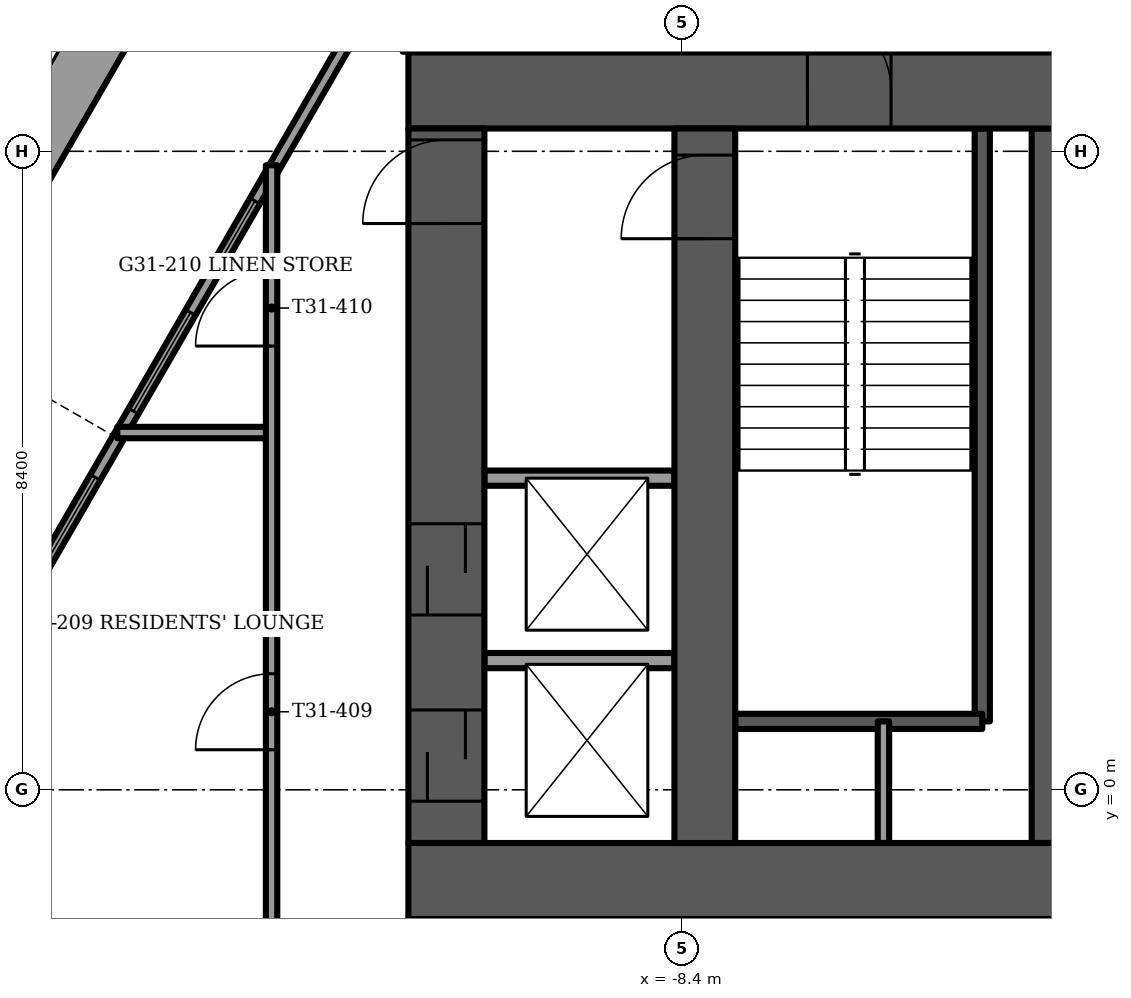
"""IFC4 building model, lengths in metres.
Left out: names, types, materials, properties, quantities, classifications, styles, units other than length and angle.
Written with IfcOpenShell. Run it as: python <this file> out.ifc"""

import sys

from ifc_helpers import new_model, si_unit, direction, frame, frame_2d, origin, place, context, subcontext, project, spatial, rectangle, extrude, element, fill, save


model = new_model("IFC4")
c1 = context("Model", 3, precision=1e-05, world=origin(), true_north=direction((0.0, 1.0)))
c2 = subcontext(c1, "Body", "Model", "MODEL_VIEW")
j1 = project(units=[si_unit("LENGTHUNIT", "METRE"), si_unit("PLANEANGLEUNIT", "RADIAN")], contexts=[c1])
p1 = place(None, origin())
s1 = spatial("IfcSite", under=j1, at=p1, CompositionType="ELEMENT")
p2 = place(p1, origin())
s2 = spatial("IfcBuilding", under=s1, at=p2, CompositionType="ELEMENT")
p3 = place(p2, frame((0.0, 0.0, 127.25)))
s3 = spatial("IfcBuildingStorey", under=s2, at=p3, CompositionType="ELEMENT", Elevation=127.25)
p4 = place(p3, frame((-12.0, -1.2, -0.3), z_axis=(0.0, 0.0, 1.0), x_axis=(1.0, 0.0, 0.0)))
e1 = element("IfcWall", 1, at=p4, inside=s3, PredefinedType="SHEAR", context=c2, shape_type="SweptSolid", body=[
    extrude(rectangle(XDim=24.0, YDim=1.0, at=frame_2d((12.0, 0.0))), origin(), (0.0, 0.0, 1.0), 3.75),
])
p5 = place(p4, frame((11.2, 0.0, 0.0)))
e2 = element("IfcOpeningElement", 2, at=p5, cuts=e1, PredefinedType="OPENING", context=c2, shape_type="SweptSolid", body=[
    extrude(rectangle(XDim=1.6, YDim=2.1, at=frame_2d((0.8, 1.05))), frame((0.0, 0.5, 0.0), z_axis=(0.0, -1.0, 0.0), x_axis=(1.0, 0.0, 0.0)), (0.0, 0.0, 1.0), 1.0),
])
p6 = place(p3, frame((-12.0, 9.2, -0.3), z_axis=(0.0, 0.0, 1.0), x_axis=(1.0, 0.0, 0.0)))
e3 = element("IfcWall", 3, at=p6, inside=s3, PredefinedType="SHEAR", context=c2, shape_type="SweptSolid", body=[
    extrude(rectangle(XDim=24.0, YDim=1.0, at=frame_2d((12.0, 0.0))), origin(), (0.0, 0.0, 1.0), 3.75),
])
p7 = place(p6, frame((11.2, 0.0, 0.0)))
e4 = element("IfcOpeningElement", 4, at=p7, cuts=e3, PredefinedType="OPENING", context=c2, shape_type="SweptSolid", body=[
    extrude(rectangle(XDim=1.6, YDim=2.1, at=frame_2d((0.8, 1.05))), frame((0.0, 0.5, 0.0), z_axis=(0.0, -1.0, 0.0), x_axis=(1.0, 0.0, 0.0)), (0.0, 0.0, 1.0), 1.0),
])
p8 = place(p6, frame((5.25, 0.0, 0.0)))
e5 = element("IfcOpeningElement", 5, at=p8, cuts=e3, PredefinedType="OPENING", context=c2, shape_type="SweptSolid", body=[
    extrude(rectangle(XDim=1.1, YDim=2.1, at=frame_2d((0.55, 1.05))), frame((0.0, 0.5, 0.0), z_axis=(0.0, -1.0, 0.0), x_axis=(1.0, 0.0, 0.0)), (0.0, 0.0, 1.0), 1.0),
])
p9 = place(p6, frame((17.65, 0.0, 0.0)))
e6 = element("IfcOpeningElement", 6, at=p9, cuts=e3, PredefinedType="OPENING", context=c2, shape_type="SweptSolid", body=[
    extrude(rectangle(XDim=1.1, YDim=2.1, at=frame_2d((0.55, 1.05))), frame((0.0, 0.5, 0.0), z_axis=(0.0, -1.0, 0.0), x_axis=(1.0, 0.0, 0.0)), (0.0, 0.0, 1.0), 1.0),
])
p10 = place(p3, frame((-8.1, -0.7, -0.3), z_axis=(0.0, 0.0, 1.0), x_axis=(0.0, 1.0, 0.0)))
e7 = element("IfcWall", 7, at=p10, inside=s3, PredefinedType="SHEAR", context=c2, shape_type="SweptSolid", body=[
    extrude(rectangle(XDim=9.4, YDim=0.8, at=frame_2d((4.7, 0.0))), origin(), (0.0, 0.0, 1.0), 3.75),
])
p11 = place(p10, frame((7.95, 0.0, 0.0)))
e8 = element("IfcOpeningElement", 8, at=p11, cuts=e7, PredefinedType="OPENING", context=c2, shape_type="SweptSolid", body=[
    extrude(rectangle(XDim=1.1, YDim=2.1, at=frame_2d((0.55, 1.05))), frame((0.0, 0.4, 0.0), z_axis=(0.0, -1.0, 0.0), x_axis=(1.0, 0.0, 0.0)), (0.0, 0.0, 1.0), 0.8),
])
p12 = place(p3, frame((-3.6, -0.7, -0.3), z_axis=(0.0, 0.0, 1.0), x_axis=(0.0, 1.0, 0.0)))
e9 = element("IfcWall", 9, at=p12, inside=s3, PredefinedType="SHEAR", context=c2, shape_type="SweptSolid", body=[
    extrude(rectangle(XDim=9.4, YDim=0.4, at=frame_2d((4.7, 0.0))), origin(), (0.0, 0.0, 1.0), 3.75),
])
p13 = place(p3, frame((-11.5, -0.7, -0.3), z_axis=(0.0, 0.0, 1.0), x_axis=(0.0, 1.0, 0.0)))
e10 = element("IfcWall", 10, at=p13, inside=s3, PredefinedType="SHEAR", context=c2, shape_type="SweptSolid", body=[
    extrude(rectangle(XDim=9.4, YDim=1.0, at=frame_2d((4.7, 0.0))), origin(), (0.0, 0.0, 1.0), 3.75),
])
p14 = place(p13, frame((8.15, 0.0, 0.0)))
e11 = element("IfcOpeningElement", 11, at=p14, cuts=e10, PredefinedType="OPENING", context=c2, shape_type="SweptSolid", body=[
    extrude(rectangle(XDim=1.1, YDim=2.1, at=frame_2d((0.55, 1.05))), frame((0.0, 0.5, 0.0), z_axis=(0.0, -1.0, 0.0), x_axis=(1.0, 0.0, 0.0)), (0.0, 0.0, 1.0), 1.0),
])
p15 = place(p13, frame((0.55, 0.0, 0.0)))
e12 = element("IfcOpeningElement", 12, at=p15, cuts=e10, PredefinedType="OPENING", context=c2, shape_type="SweptSolid", body=[
    extrude(rectangle(XDim=1.2, YDim=2.1, at=frame_2d((0.6, 1.05))), frame((0.0, 0.5, 0.0), z_axis=(0.0, -1.0, 0.0), x_axis=(1.0, 0.0, 0.0)), (0.0, 0.0, 1.0), 1.0),
])
p16 = place(p13, frame((3.0, 0.0, 0.0)))
e13 = element("IfcOpeningElement", 13, at=p16, cuts=e10, PredefinedType="OPENING", context=c2, shape_type="SweptSolid", body=[
    extrude(rectangle(XDim=1.2, YDim=2.1, at=frame_2d((0.6, 1.05))), frame((0.0, 0.5, 0.0), z_axis=(0.0, -1.0, 0.0), x_axis=(1.0, 0.0, 0.0)), (0.0, 0.0, 1.0), 1.0),
])
p17 = place(p3, frame((-14.733, 12.359, 0.0), z_axis=(0.0, 0.0, 1.0), x_axis=(-0.499999023957, -0.866025967302, 0.0)))
e14 = element("IfcWall", 14, at=p17, inside=s3, PredefinedType="PARAPET", context=c2, shape_type="SweptSolid", body=[
    extrude(rectangle(XDim=6.673, YDim=0.9, at=frame_2d((3.337, 0.0))), origin(), (0.0, 0.0, 1.0), 1.1),
])
p18 = place(p3, frame((-7.642, 18.792, 0.0), z_axis=(0.0, 0.0, 1.0), x_axis=(-0.500001219746, -0.866024699562, 0.0)))
e15 = element("IfcWall", 15, at=p18, inside=s3, PredefinedType="SOLIDWALL", context=c2, shape_type="SweptSolid", body=[
    extrude(rectangle(XDim=22.137, YDim=0.15, at=frame_2d((11.068, 0.0))), origin(), (0.0, 0.0, 1.0), 3.45),
])
p19 = place(p18, frame((4.354, 0.0, 0.15)))
e16 = element("IfcOpeningElement", 16, at=p19, cuts=e15, PredefinedType="OPENING", context=c2, shape_type="SweptSolid", body=[
    extrude(rectangle(XDim=0.9, YDim=2.85, at=frame_2d((0.45, 1.425))), frame((0.0, 0.075, 0.0), z_axis=(0.0, -1.0, 0.0), x_axis=(1.0, 0.0, 0.0)), (0.0, 0.0, 1.0), 0.15),
])
p20 = place(p18, frame((6.454, 0.0, 0.15)))
e17 = element("IfcOpeningElement", 17, at=p20, cuts=e15, PredefinedType="OPENING", context=c2, shape_type="SweptSolid", body=[
    extrude(rectangle(XDim=1.5, YDim=2.85, at=frame_2d((0.75, 1.425))), frame((0.0, 0.075, 0.0), z_axis=(0.0, -1.0, 0.0), x_axis=(1.0, 0.0, 0.0)), (0.0, 0.0, 1.0), 0.15),
])
p21 = place(p18, frame((8.554, 0.0, 0.15)))
e18 = element("IfcOpeningElement", 18, at=p21, cuts=e15, PredefinedType="OPENING", context=c2, shape_type="SweptSolid", body=[
    extrude(rectangle(XDim=0.9, YDim=2.85, at=frame_2d((0.45, 1.425))), frame((0.0, 0.075, 0.0), z_axis=(0.0, -1.0, 0.0), x_axis=(1.0, 0.0, 0.0)), (0.0, 0.0, 1.0), 0.15),
])
p22 = place(p18, frame((12.754, 0.0, 0.15)))
e19 = element("IfcOpeningElement", 19, at=p22, cuts=e15, PredefinedType="OPENING", context=c2, shape_type="SweptSolid", body=[
    extrude(rectangle(XDim=0.9, YDim=2.85, at=frame_2d((0.45, 1.425))), frame((0.0, 0.075, 0.0), z_axis=(0.0, -1.0, 0.0), x_axis=(1.0, 0.0, 0.0)), (0.0, 0.0, 1.0), 0.15),
])
p23 = place(p18, frame((14.449, 0.0, 0.15)))
e20 = element("IfcOpeningElement", 20, at=p23, cuts=e15, PredefinedType="OPENING", context=c2, shape_type="SweptSolid", body=[
    extrude(rectangle(XDim=1.5, YDim=2.85, at=frame_2d((0.75, 1.425))), frame((0.0, 0.075, 0.0), z_axis=(0.0, -1.0, 0.0), x_axis=(1.0, 0.0, 0.0)), (0.0, 0.0, 1.0), 0.15),
])
p24 = place(p18, frame((16.954, 0.0, 0.15)))
e21 = element("IfcOpeningElement", 21, at=p24, cuts=e15, PredefinedType="OPENING", context=c2, shape_type="SweptSolid", body=[
    extrude(rectangle(XDim=1.7, YDim=2.85, at=frame_2d((0.85, 1.425))), frame((0.0, 0.075, 0.0), z_axis=(0.0, -1.0, 0.0), x_axis=(1.0, 0.0, 0.0)), (0.0, 0.0, 1.0), 0.15),
])
p25 = place(p18, frame((19.054, 0.0, 0.0)))
e22 = element("IfcOpeningElement", 22, at=p25, cuts=e15, PredefinedType="OPENING", context=c2, shape_type="SweptSolid", body=[
    extrude(rectangle(XDim=1.5, YDim=2.4, at=frame_2d((0.75, 1.2))), frame((0.0, 0.075, 0.0), z_axis=(0.0, -1.0, 0.0), x_axis=(1.0, 0.0, 0.0)), (0.0, 0.0, 1.0), 0.15),
])
p26 = place(p18, frame((1.021, 0.0, 0.15)))
e23 = element("IfcOpeningElement", 23, at=p26, cuts=e15, PredefinedType="OPENING", context=c2, shape_type="SweptSolid", body=[
    extrude(rectangle(XDim=1.7, YDim=2.73, at=frame_2d((0.85, 1.365))), frame((0.0, 0.075, 0.0), z_axis=(0.0, -1.0, 0.0), x_axis=(1.0, 0.0, 0.0)), (0.0, 0.0, 1.0), 0.15),
])
p27 = place(p3, frame((-18.71, -1.444, 0.0), z_axis=(0.0, 0.0, 1.0), x_axis=(0.500010582961, -0.866019293623, 0.0)))
e24 = element("IfcWall", 24, at=p27, inside=s3, PredefinedType="SOLIDWALL", context=c2, shape_type="SweptSolid", body=[
    extrude(rectangle(XDim=16.21, YDim=0.15, at=frame_2d((8.105, 0.0))), origin(), (0.0, 0.0, 1.0), 3.45),
])
p28 = place(p27, frame((2.93, 0.0, 0.15)))
e25 = element("IfcOpeningElement", 25, at=p28, cuts=e24, PredefinedType="OPENING", context=c2, shape_type="SweptSolid", body=[
    extrude(rectangle(XDim=0.9, YDim=2.85, at=frame_2d((0.45, 1.425))), frame((0.0, 0.075, 0.0), z_axis=(0.0, -1.0, 0.0), x_axis=(1.0, 0.0, 0.0)), (0.0, 0.0, 1.0), 0.15),
])
p29 = place(p27, frame((4.205, 0.0, 0.0)))
e26 = element("IfcOpeningElement", 26, at=p29, cuts=e24, PredefinedType="OPENING", context=c2, shape_type="SweptSolid", body=[
    extrude(rectangle(XDim=1.5, YDim=2.4, at=frame_2d((0.75, 1.2))), frame((0.0, 0.075, 0.0), z_axis=(0.0, -1.0, 0.0), x_axis=(1.0, 0.0, 0.0)), (0.0, 0.0, 1.0), 0.15),
])
p30 = place(p27, frame((6.305, 0.0, 0.15)))
e27 = element("IfcOpeningElement", 27, at=p30, cuts=e24, PredefinedType="OPENING", context=c2, shape_type="SweptSolid", body=[
    extrude(rectangle(XDim=1.7, YDim=2.85, at=frame_2d((0.85, 1.425))), frame((0.0, 0.075, 0.0), z_axis=(0.0, -1.0, 0.0), x_axis=(1.0, 0.0, 0.0)), (0.0, 0.0, 1.0), 0.15),
])
p31 = place(p27, frame((8.405, 0.0, 0.0)))
e28 = element("IfcOpeningElement", 28, at=p31, cuts=e24, PredefinedType="OPENING", context=c2, shape_type="SweptSolid", body=[
    extrude(rectangle(XDim=1.5, YDim=2.4, at=frame_2d((0.75, 1.2))), frame((0.0, 0.075, 0.0), z_axis=(0.0, -1.0, 0.0), x_axis=(1.0, 0.0, 0.0)), (0.0, 0.0, 1.0), 0.15),
])
p32 = place(p27, frame((10.505, 0.0, 0.15)))
e29 = element("IfcOpeningElement", 29, at=p32, cuts=e24, PredefinedType="OPENING", context=c2, shape_type="SweptSolid", body=[
    extrude(rectangle(XDim=1.7, YDim=2.85, at=frame_2d((0.85, 1.425))), frame((0.0, 0.075, 0.0), z_axis=(0.0, -1.0, 0.0), x_axis=(1.0, 0.0, 0.0)), (0.0, 0.0, 1.0), 0.15),
])
p33 = place(p27, frame((12.605, 0.0, 0.0)))
e30 = element("IfcOpeningElement", 30, at=p33, cuts=e24, PredefinedType="OPENING", context=c2, shape_type="SweptSolid", body=[
    extrude(rectangle(XDim=1.5, YDim=2.4, at=frame_2d((0.75, 1.2))), frame((0.0, 0.075, 0.0), z_axis=(0.0, -1.0, 0.0), x_axis=(1.0, 0.0, 0.0)), (0.0, 0.0, 1.0), 0.15),
])
p34 = place(p27, frame((0.402, 0.0, 0.15)))
e31 = element("IfcOpeningElement", 31, at=p34, cuts=e24, PredefinedType="OPENING", context=c2, shape_type="SweptSolid", body=[
    extrude(rectangle(XDim=0.9, YDim=2.73, at=frame_2d((0.45, 1.365))), frame((0.0, 0.075, 0.0), z_axis=(0.0, -1.0, 0.0), x_axis=(1.0, 0.0, 0.0)), (0.0, 0.0, 1.0), 0.15),
])
p35 = place(p27, frame((14.907, 0.0, 0.15)))
e32 = element("IfcOpeningElement", 32, at=p35, cuts=e24, PredefinedType="OPENING", context=c2, shape_type="SweptSolid", body=[
    extrude(rectangle(XDim=0.9, YDim=2.73, at=frame_2d((0.45, 1.365))), frame((0.0, 0.075, 0.0), z_axis=(0.0, -1.0, 0.0), x_axis=(1.0, 0.0, 0.0)), (0.0, 0.0, 1.0), 0.15),
])
p36 = place(p3, frame((-4.45, 0.9, -0.3), z_axis=(0.0, 0.0, 1.0), x_axis=(0.0, 1.0, 0.0)))
e33 = element("IfcWall", 33, at=p36, inside=s3, PredefinedType="SOLIDWALL", context=c2, shape_type="SweptSolid", body=[
    extrude(rectangle(XDim=7.8, YDim=0.2, at=frame_2d((3.9, 0.0))), origin(), (0.0, 0.0, 1.0), 3.75),
])
p37 = place(p3, frame((-7.7, 0.9, -0.3), z_axis=(0.0, 0.0, 1.0), x_axis=(1.0, 0.0, 0.0)))
e34 = element("IfcWall", 34, at=p37, inside=s3, PredefinedType="SOLIDWALL", context=c2, shape_type="SweptSolid", body=[
    extrude(rectangle(XDim=3.25, YDim=0.2, at=frame_2d((1.625, 0.0))), origin(), (0.0, 0.0, 1.0), 3.75),
])
p38 = place(p3, frame((-5.75, -0.7, 0.0), z_axis=(0.0, 0.0, 1.0), x_axis=(0.0, 1.0, 0.0)))
e35 = element("IfcWall", 35, at=p38, inside=s3, PredefinedType="PARTITIONING", context=c2, shape_type="SweptSolid", body=[
    extrude(rectangle(XDim=1.6, YDim=0.15, at=frame_2d((0.8, 0.0))), origin(), (0.0, 0.0, 1.0), 3.45),
])
for number, where, z_axis, x_axis in (
    (36, (-11.0, 1.7, 0.0), (0.0, 0.0, 1.0), (1.0, 0.0, 0.0)),
    (37, (-11.0, 4.1, 0.0), (0.0, 0.0, 1.0), (1.0, 0.0, 0.0)),
):
    element("IfcWall", number, at=place(p3, frame(where, z_axis=z_axis, x_axis=x_axis)), inside=s3, PredefinedType="PARTITIONING", context=c2, shape_type="SweptSolid", body=[
        extrude(rectangle(XDim=2.5, YDim=0.2, at=frame_2d((1.25, 0.0))), origin(), (0.0, 0.0, 1.0), 3.45),
    ])
p39 = place(p3, frame((-15.83, 4.7, 0.0), z_axis=(0.0, 0.0, 1.0), x_axis=(1.0, 0.0, 0.0)))
e38 = element("IfcWall", 38, at=p39, inside=s3, PredefinedType="PARTITIONING", context=c2, shape_type="SweptSolid", body=[
    extrude(rectangle(XDim=2.03, YDim=0.15, at=frame_2d((1.015, 0.0))), origin(), (0.0, 0.0, 1.0), 3.45),
])
p40 = place(p3, frame((-13.8, -3.7, 0.0), z_axis=(0.0, 0.0, 1.0), x_axis=(0.0, 1.0, 0.0)))
e39 = element("IfcWall", 39, at=p40, inside=s3, PredefinedType="PARTITIONING", context=c2, shape_type="SweptSolid", body=[
    extrude(rectangle(XDim=11.916, YDim=0.15, at=frame_2d((5.958, 0.0))), origin(), (0.0, 0.0, 1.0), 3.45),
])
p41 = place(p40, frame((4.227, 0.0, 0.0)))
e40 = element("IfcOpeningElement", 40, at=p41, cuts=e39, PredefinedType="OPENING", context=c2, shape_type="SweptSolid", body=[
    extrude(rectangle(XDim=1.0, YDim=2.1, at=frame_2d((0.5, 1.05))), frame((0.0, 0.075, 0.0), z_axis=(0.0, -1.0, 0.0), x_axis=(1.0, 0.0, 0.0)), (0.0, 0.0, 1.0), 0.15),
])
p42 = place(p40, frame((9.538, 0.0, 0.0)))
e41 = element("IfcOpeningElement", 41, at=p42, cuts=e39, PredefinedType="OPENING", context=c2, shape_type="SweptSolid", body=[
    extrude(rectangle(XDim=1.0, YDim=2.1, at=frame_2d((0.5, 1.05))), frame((0.0, 0.075, 0.0), z_axis=(0.0, -1.0, 0.0), x_axis=(1.0, 0.0, 0.0)), (0.0, 0.0, 1.0), 0.15),
])
p43 = place(p22, origin())
e42 = element("IfcWindow", 42, at=p43, inside=s3, PartitioningType="SINGLE_PANEL", PredefinedType="WINDOW", context=c2, shape_type="SweptSolid", body=[
    extrude(rectangle(XDim=0.9, YDim=2.85, at=frame_2d((0.45, 1.425))), frame((0.0, 0.03, 0.0), z_axis=(0.0, -1.0, 0.0), x_axis=(1.0, 0.0, 0.0)), (0.0, 0.0, 1.0), 0.06),
])
fill(e19, e42)
p44 = place(p23, origin())
e43 = element("IfcWindow", 43, at=p44, inside=s3, PartitioningType="SINGLE_PANEL", PredefinedType="WINDOW", context=c2, shape_type="SweptSolid", body=[
    extrude(rectangle(XDim=1.5, YDim=2.85, at=frame_2d((0.75, 1.425))), frame((0.0, 0.03, 0.0), z_axis=(0.0, -1.0, 0.0), x_axis=(1.0, 0.0, 0.0)), (0.0, 0.0, 1.0), 0.06),
])
fill(e20, e43)
p45 = place(p24, origin())
e44 = element("IfcWindow", 44, at=p45, inside=s3, PartitioningType="SINGLE_PANEL", PredefinedType="WINDOW", context=c2, shape_type="SweptSolid", body=[
    extrude(rectangle(XDim=1.7, YDim=2.85, at=frame_2d((0.85, 1.425))), frame((0.0, 0.03, 0.0), z_axis=(0.0, -1.0, 0.0), x_axis=(1.0, 0.0, 0.0)), (0.0, 0.0, 1.0), 0.06),
])
fill(e21, e44)
p46 = place(p8, origin())
e45 = element("IfcDoor", 45, at=p46, inside=s3, OperationType="SINGLE_SWING_LEFT", PredefinedType="DOOR", context=c2, shape_type="SweptSolid", body=[
    extrude(rectangle(XDim=1.1, YDim=2.1, at=frame_2d((0.55, 1.05))), frame((0.0, 0.025, 0.0), z_axis=(0.0, -1.0, 0.0), x_axis=(1.0, 0.0, 0.0)), (0.0, 0.0, 1.0), 0.05),
])
fill(e5, e45)
p47 = place(p11, origin())
e46 = element("IfcDoor", 46, at=p47, inside=s3, OperationType="SINGLE_SWING_RIGHT", PredefinedType="DOOR", context=c2, shape_type="SweptSolid", body=[
    extrude(rectangle(XDim=1.1, YDim=2.1, at=frame_2d((0.55, 1.05))), frame((0.0, 0.025, 0.0), z_axis=(0.0, -1.0, 0.0), x_axis=(1.0, 0.0, 0.0)), (0.0, 0.0, 1.0), 0.05),
])
fill(e8, e46)
p48 = place(p14, origin())
e47 = element("IfcDoor", 47, at=p48, inside=s3, OperationType="SINGLE_SWING_LEFT", PredefinedType="DOOR", context=c2, shape_type="SweptSolid", body=[
    extrude(rectangle(XDim=1.1, YDim=2.1, at=frame_2d((0.55, 1.05))), frame((0.0, 0.025, 0.0), z_axis=(0.0, -1.0, 0.0), x_axis=(1.0, 0.0, 0.0)), (0.0, 0.0, 1.0), 0.05),
])
fill(e11, e47)
p49 = place(p15, origin())
e48 = element("IfcDoor", 48, at=p49, inside=s3, OperationType="SLIDING_TO_LEFT", PredefinedType="DOOR", context=c2, shape_type="SweptSolid", body=[
    extrude(rectangle(XDim=1.2, YDim=2.1, at=frame_2d((0.6, 1.05))), frame((0.0, 0.025, 0.0), z_axis=(0.0, -1.0, 0.0), x_axis=(1.0, 0.0, 0.0)), (0.0, 0.0, 1.0), 0.05),
])
fill(e12, e48)
p50 = place(p16, origin())
e49 = element("IfcDoor", 49, at=p50, inside=s3, OperationType="SLIDING_TO_LEFT", PredefinedType="DOOR", context=c2, shape_type="SweptSolid", body=[
    extrude(rectangle(XDim=1.2, YDim=2.1, at=frame_2d((0.6, 1.05))), frame((0.0, 0.025, 0.0), z_axis=(0.0, -1.0, 0.0), x_axis=(1.0, 0.0, 0.0)), (0.0, 0.0, 1.0), 0.05),
])
fill(e13, e49)
p51 = place(p41, origin())
e50 = element("IfcDoor", 50, at=p51, inside=s3, OperationType="SINGLE_SWING_LEFT", PredefinedType="DOOR", context=c2, shape_type="SweptSolid", body=[
    extrude(rectangle(XDim=1.0, YDim=2.1, at=frame_2d((0.5, 1.05))), frame((0.0, 0.025, 0.0), z_axis=(0.0, -1.0, 0.0), x_axis=(1.0, 0.0, 0.0)), (0.0, 0.0, 1.0), 0.05),
])
fill(e40, e50)
p52 = place(p42, origin())
e51 = element("IfcDoor", 51, at=p52, inside=s3, OperationType="SINGLE_SWING_LEFT", PredefinedType="DOOR", context=c2, shape_type="SweptSolid", body=[
    extrude(rectangle(XDim=1.0, YDim=2.1, at=frame_2d((0.5, 1.05))), frame((0.0, 0.025, 0.0), z_axis=(0.0, -1.0, 0.0), x_axis=(1.0, 0.0, 0.0)), (0.0, 0.0, 1.0), 0.05),
])
fill(e41, e51)
save(model, sys.argv[1])
